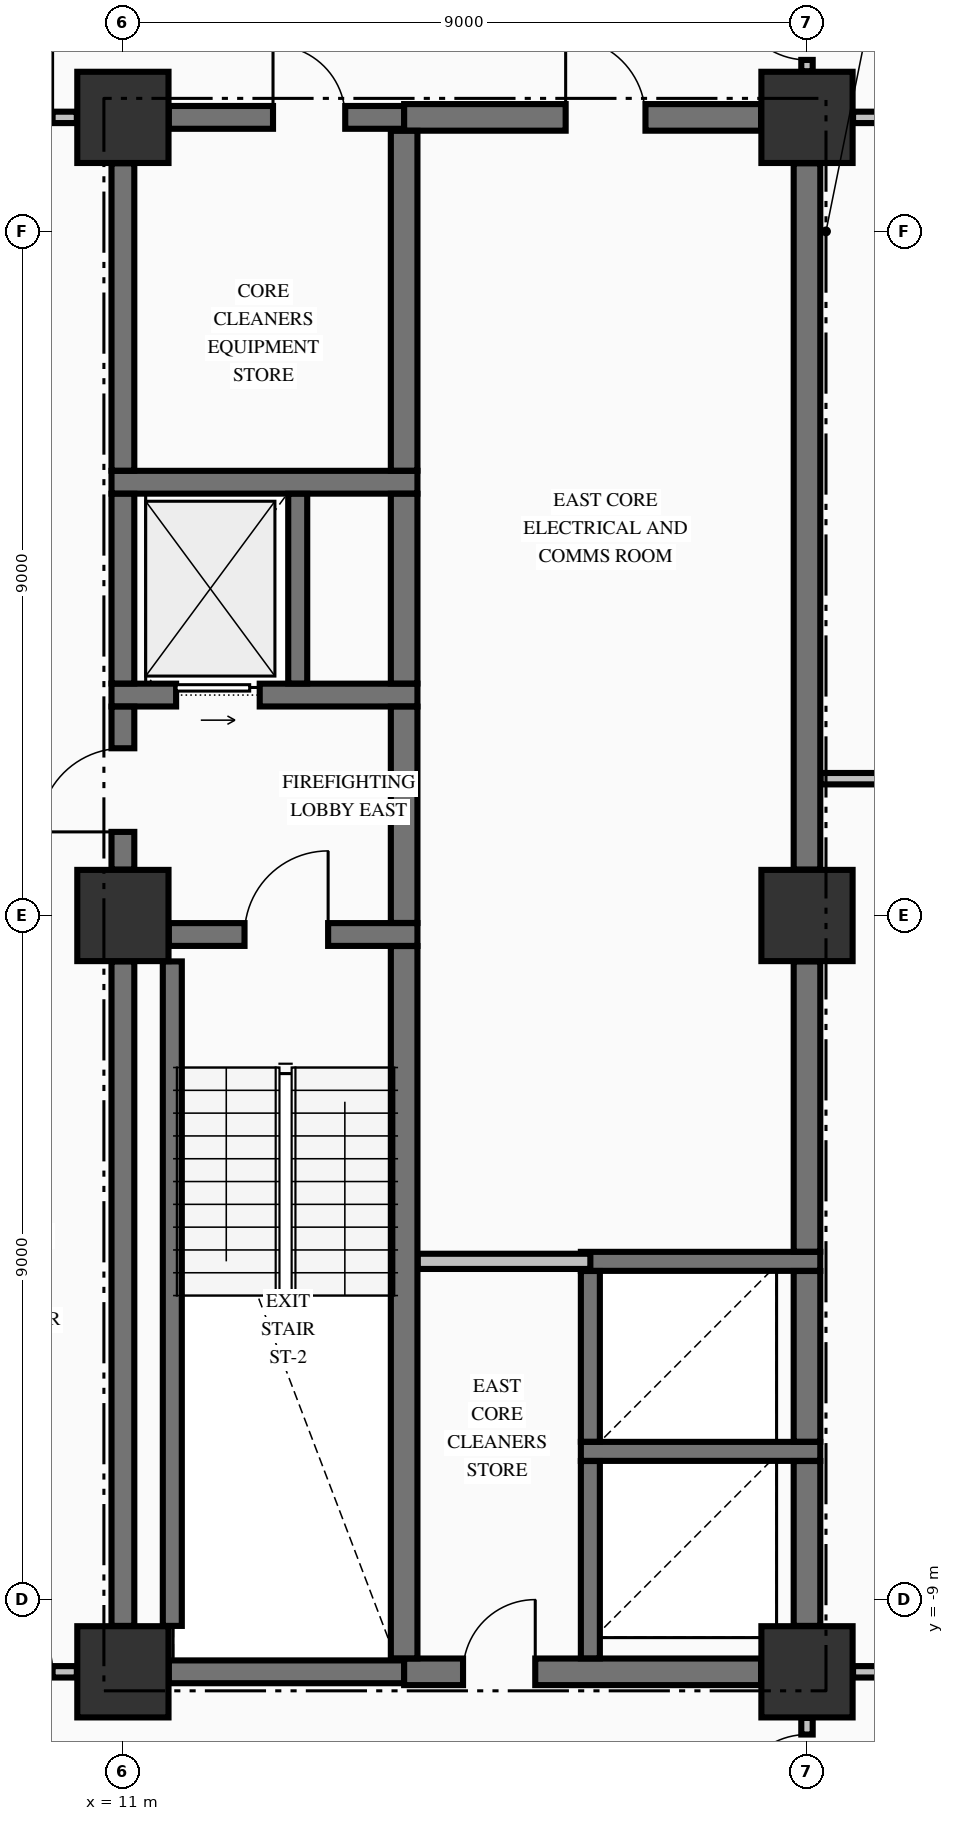
"""IFC4 building model, lengths in metres.
Left out: names, types, materials, properties, quantities, classifications, styles, units other than length and angle.
Written with IfcOpenShell. Run it as: python <this file> out.ifc"""

import sys

from ifc_helpers import new_model, si_unit, direction, frame, frame_2d, origin, origin_2d, place, context, subcontext, project, spatial, rectangle, extrude, element, fill, save


model = new_model("IFC4")
c1 = context("Model", 3, precision=1e-05, world=origin(), true_north=direction((0.0, 1.0)))
c2 = subcontext(c1, "Body", "Model", "MODEL_VIEW")
j1 = project(units=[si_unit("LENGTHUNIT", "METRE"), si_unit("PLANEANGLEUNIT", "RADIAN")], contexts=[c1])
p1 = place(None, origin())
s1 = spatial("IfcSite", under=j1, at=p1, CompositionType="ELEMENT")
p2 = place(p1, origin())
s2 = spatial("IfcBuilding", under=s1, at=p2, CompositionType="ELEMENT")
p3 = place(p2, frame((0.0, 0.0, 30.77)))
s3 = spatial("IfcBuildingStorey", under=s2, at=p3, CompositionType="ELEMENT", Elevation=30.77)
for number, where, z_axis, x_axis in (
    (1, (11.0, -9.95, -0.25), (0.0, 0.0, 1.0), (1.0, 0.0, 0.0)),
    (2, (11.0, 0.0, -0.25), (0.0, 0.0, 1.0), (1.0, 0.0, 0.0)),
    (3, (11.0, 10.5, -0.25), (0.0, 0.0, 1.0), (1.0, 0.0, 0.0)),
    (4, (20.0, -9.95, -0.25), (0.0, 0.0, 1.0), (1.0, 0.0, 0.0)),
    (5, (20.0, 10.5, -0.25), (0.0, 0.0, 1.0), (1.0, 0.0, 0.0)),
    (6, (20.0, 0.0, -0.25), (0.0, 0.0, 1.0), (1.0, 0.0, 0.0)),
):
    element("IfcColumn", number, at=place(p3, frame(where, z_axis=z_axis, x_axis=x_axis)), inside=s3, PredefinedType="COLUMN", context=c2, shape_type="SweptSolid", body=[
        extrude(rectangle(XDim=1.2, YDim=1.2, at=origin_2d()), origin(), (0.0, 0.0, 1.0), 3.52),
    ])
p4 = place(p3, frame((11.604, -9.95, 0.0), z_axis=(0.0, 0.0, 1.0), x_axis=(1.0, 0.0, 0.0)))
e7 = element("IfcWall", 7, at=p4, inside=s3, PredefinedType="SHEAR", context=c2, shape_type="SweptSolid", body=[
    extrude(rectangle(XDim=3.096, YDim=0.3, at=frame_2d((1.548, 0.0))), origin(), (0.0, 0.0, 1.0), 3.27),
])
p5 = place(p3, frame((14.7, -9.95, 0.0), z_axis=(0.0, 0.0, 1.0), x_axis=(1.0, 0.0, 0.0)))
e8 = element("IfcWall", 8, at=p5, inside=s3, PredefinedType="SHEAR", context=c2, shape_type="SweptSolid", body=[
    extrude(rectangle(XDim=4.696, YDim=0.35, at=frame_2d((2.348, 0.0))), origin(), (0.0, 0.0, 1.0), 3.27),
])
p6 = place(p5, frame((0.775, 0.0, 0.0)))
e9 = element("IfcOpeningElement", 9, at=p6, cuts=e8, PredefinedType="OPENING", context=c2, shape_type="SweptSolid", body=[
    extrude(rectangle(XDim=0.95, YDim=2.15, at=frame_2d((0.475, 1.075))), frame((0.0, 0.185, 0.0), z_axis=(0.0, -1.0, 0.0), x_axis=(1.0, 0.0, 0.0)), (0.0, 0.0, 1.0), 0.37),
])
for number, where, z_axis, x_axis in (
    (10, (17.025, -7.05, 0.0), (0.0, 0.0, 1.0), (1.0, 0.0, 0.0)),
    (11, (17.025, -4.55, 0.0), (0.0, 0.0, 1.0), (1.0, 0.0, 0.0)),
):
    element("IfcWall", number, at=place(p3, frame(where, z_axis=z_axis, x_axis=x_axis)), inside=s3, PredefinedType="SOLIDWALL", context=c2, shape_type="SweptSolid", body=[
        extrude(rectangle(XDim=3.15, YDim=0.25, at=frame_2d((1.575, 0.0))), origin(), (0.0, 0.0, 1.0), 3.27),
    ])
p7 = place(p3, frame((11.604, -0.25, 0.0), z_axis=(0.0, 0.0, 1.0), x_axis=(1.0, 0.0, 0.0)))
e12 = element("IfcWall", 12, at=p7, inside=s3, PredefinedType="SHEAR", context=c2, shape_type="SweptSolid", body=[
    extrude(rectangle(XDim=3.271, YDim=0.3, at=frame_2d((1.635, 0.0))), origin(), (0.0, 0.0, 1.0), 3.27),
])
p8 = place(p7, frame((0.996, 0.0, 0.0)))
e13 = element("IfcOpeningElement", 13, at=p8, cuts=e12, PredefinedType="OPENING", context=c2, shape_type="SweptSolid", body=[
    extrude(rectangle(XDim=1.1, YDim=2.15, at=frame_2d((0.55, 1.075))), frame((0.0, 0.16, 0.0), z_axis=(0.0, -1.0, 0.0), x_axis=(1.0, 0.0, 0.0)), (0.0, 0.0, 1.0), 0.32),
])
p9 = place(p3, frame((10.85, 2.9, 0.0), z_axis=(0.0, 0.0, 1.0), x_axis=(1.0, 0.0, 0.0)))
e14 = element("IfcWall", 14, at=p9, inside=s3, PredefinedType="SHEAR", context=c2, shape_type="SweptSolid", body=[
    extrude(rectangle(XDim=4.025, YDim=0.3, at=frame_2d((2.012, 0.0))), origin(), (0.0, 0.0, 1.0), 3.27),
])
p10 = place(p9, frame((0.85, 0.0, 0.0)))
e15 = element("IfcOpeningElement", 15, at=p10, cuts=e14, PredefinedType="OPENING", context=c2, shape_type="SweptSolid", body=[
    extrude(rectangle(XDim=1.1, YDim=2.2, at=frame_2d((0.55, 1.1))), frame((0.0, 0.16, 0.0), z_axis=(0.0, -1.0, 0.0), x_axis=(1.0, 0.0, 0.0)), (0.0, 0.0, 1.0), 0.32),
])
p11 = place(p3, frame((10.85, 5.7, 0.0), z_axis=(0.0, 0.0, 1.0), x_axis=(1.0, 0.0, 0.0)))
e16 = element("IfcWall", 16, at=p11, inside=s3, PredefinedType="SHEAR", context=c2, shape_type="SweptSolid", body=[
    extrude(rectangle(XDim=4.025, YDim=0.3, at=frame_2d((2.012, 0.0))), origin(), (0.0, 0.0, 1.0), 3.27),
])
p12 = place(p3, frame((11.604, 10.5, 0.0), z_axis=(0.0, 0.0, 1.0), x_axis=(1.0, 0.0, 0.0)))
e17 = element("IfcWall", 17, at=p12, inside=s3, PredefinedType="SHEAR", context=c2, shape_type="SweptSolid", body=[
    extrude(rectangle(XDim=3.096, YDim=0.3, at=frame_2d((1.548, 0.0))), origin(), (0.0, 0.0, 1.0), 3.27),
])
p13 = place(p12, frame((1.371, 0.0, 0.0)))
e18 = element("IfcOpeningElement", 18, at=p13, cuts=e17, PredefinedType="OPENING", context=c2, shape_type="SweptSolid", body=[
    extrude(rectangle(XDim=0.95, YDim=2.15, at=frame_2d((0.475, 1.075))), frame((0.0, 0.16, 0.0), z_axis=(0.0, -1.0, 0.0), x_axis=(1.0, 0.0, 0.0)), (0.0, 0.0, 1.0), 0.32),
])
p14 = place(p3, frame((14.7, 10.5, 0.0), z_axis=(0.0, 0.0, 1.0), x_axis=(1.0, 0.0, 0.0)))
e19 = element("IfcWall", 19, at=p14, inside=s3, PredefinedType="SHEAR", context=c2, shape_type="SweptSolid", body=[
    extrude(rectangle(XDim=4.696, YDim=0.35, at=frame_2d((2.348, 0.0))), origin(), (0.0, 0.0, 1.0), 3.27),
])
p15 = place(p14, frame((2.125, 0.0, 0.0)))
e20 = element("IfcOpeningElement", 20, at=p15, cuts=e19, PredefinedType="OPENING", context=c2, shape_type="SweptSolid", body=[
    extrude(rectangle(XDim=1.05, YDim=2.15, at=frame_2d((0.525, 1.075))), frame((0.0, 0.185, 0.0), z_axis=(0.0, -1.0, 0.0), x_axis=(1.0, 0.0, 0.0)), (0.0, 0.0, 1.0), 0.37),
])
p16 = place(p3, frame((-10.394, -9.95, 0.0), z_axis=(0.0, 0.0, 1.0), x_axis=(1.0, 0.0, 0.0)))
e21 = element("IfcWall", 21, at=p16, inside=s3, PredefinedType="PARTITIONING", context=c2, shape_type="SweptSolid", body=[
    extrude(rectangle(XDim=20.788, YDim=0.15, at=frame_2d((10.394, 0.0))), origin(), (0.0, 0.0, 1.0), 3.27),
])
p17 = place(p16, frame((0.319, 0.0, 0.0)))
e22 = element("IfcOpeningElement", 22, at=p17, cuts=e21, PredefinedType="OPENING", context=c2, shape_type="SweptSolid", body=[
    extrude(rectangle(XDim=1.05, YDim=2.15, at=frame_2d((0.525, 1.075))), frame((0.0, 0.085, 0.0), z_axis=(0.0, -1.0, 0.0), x_axis=(1.0, 0.0, 0.0)), (0.0, 0.0, 1.0), 0.17),
])
p18 = place(p16, frame((19.419, 0.0, 0.0)))
e23 = element("IfcOpeningElement", 23, at=p18, cuts=e21, PredefinedType="OPENING", context=c2, shape_type="SweptSolid", body=[
    extrude(rectangle(XDim=1.05, YDim=2.15, at=frame_2d((0.525, 1.075))), frame((0.0, 0.085, 0.0), z_axis=(0.0, -1.0, 0.0), x_axis=(1.0, 0.0, 0.0)), (0.0, 0.0, 1.0), 0.17),
])
p19 = place(p16, frame((11.569, 0.0, 0.0)))
e24 = element("IfcOpeningElement", 24, at=p19, cuts=e21, PredefinedType="OPENING", context=c2, shape_type="SweptSolid", body=[
    extrude(rectangle(XDim=0.95, YDim=2.15, at=frame_2d((0.475, 1.075))), frame((0.0, 0.085, 0.0), z_axis=(0.0, -1.0, 0.0), x_axis=(1.0, 0.0, 0.0)), (0.0, 0.0, 1.0), 0.17),
])
p20 = place(p3, frame((20.606, -9.95, 0.0), z_axis=(0.0, 0.0, 1.0), x_axis=(1.0, 0.0, 0.0)))
e25 = element("IfcWall", 25, at=p20, inside=s3, PredefinedType="PARTITIONING", context=c2, shape_type="SweptSolid", body=[
    extrude(rectangle(XDim=8.229, YDim=0.15, at=frame_2d((4.115, 0.0))), origin(), (0.0, 0.0, 1.0), 3.27),
])
p21 = place(p20, frame((3.419, 0.0, 0.0)))
e26 = element("IfcOpeningElement", 26, at=p21, cuts=e25, PredefinedType="OPENING", context=c2, shape_type="SweptSolid", body=[
    extrude(rectangle(XDim=0.95, YDim=2.15, at=frame_2d((0.475, 1.075))), frame((0.0, 0.085, 0.0), z_axis=(0.0, -1.0, 0.0), x_axis=(1.0, 0.0, 0.0)), (0.0, 0.0, 1.0), 0.17),
])
p22 = place(p3, frame((14.878, -4.55, 0.0), z_axis=(0.0, 0.0, 1.0), x_axis=(1.0, 0.0, 0.0)))
e27 = element("IfcWall", 27, at=p22, inside=s3, PredefinedType="PARTITIONING", context=c2, shape_type="SweptSolid", body=[
    extrude(rectangle(XDim=2.272, YDim=0.2, at=frame_2d((1.136, 0.0))), origin(), (0.0, 0.0, 1.0), 3.27),
])
p23 = place(p3, frame((20.178, 1.8, 0.0), z_axis=(0.0, 0.0, 1.0), x_axis=(1.0, 0.0, 0.0)))
e28 = element("IfcWall", 28, at=p23, inside=s3, PredefinedType="PARTITIONING", context=c2, shape_type="SweptSolid", body=[
    extrude(rectangle(XDim=8.657, YDim=0.15, at=frame_2d((4.329, 0.0))), origin(), (0.0, 0.0, 1.0), 3.27),
])
p24 = place(p3, frame((-10.394, 10.5, 0.0), z_axis=(0.0, 0.0, 1.0), x_axis=(1.0, 0.0, 0.0)))
e29 = element("IfcWall", 29, at=p24, inside=s3, PredefinedType="PARTITIONING", context=c2, shape_type="SweptSolid", body=[
    extrude(rectangle(XDim=20.788, YDim=0.15, at=frame_2d((10.394, 0.0))), origin(), (0.0, 0.0, 1.0), 3.27),
])
p25 = place(p24, frame((0.319, 0.0, 0.0)))
e30 = element("IfcOpeningElement", 30, at=p25, cuts=e29, PredefinedType="OPENING", context=c2, shape_type="SweptSolid", body=[
    extrude(rectangle(XDim=1.05, YDim=2.15, at=frame_2d((0.525, 1.075))), frame((0.0, 0.085, 0.0), z_axis=(0.0, -1.0, 0.0), x_axis=(1.0, 0.0, 0.0)), (0.0, 0.0, 1.0), 0.17),
])
p26 = place(p24, frame((19.419, 0.0, 0.0)))
e31 = element("IfcOpeningElement", 31, at=p26, cuts=e29, PredefinedType="OPENING", context=c2, shape_type="SweptSolid", body=[
    extrude(rectangle(XDim=1.05, YDim=2.15, at=frame_2d((0.525, 1.075))), frame((0.0, 0.085, 0.0), z_axis=(0.0, -1.0, 0.0), x_axis=(1.0, 0.0, 0.0)), (0.0, 0.0, 1.0), 0.17),
])
p27 = place(p3, frame((20.606, 10.5, 0.0), z_axis=(0.0, 0.0, 1.0), x_axis=(1.0, 0.0, 0.0)))
e32 = element("IfcWall", 32, at=p27, inside=s3, PredefinedType="PARTITIONING", context=c2, shape_type="SweptSolid", body=[
    extrude(rectangle(XDim=8.229, YDim=0.15, at=frame_2d((4.115, 0.0))), origin(), (0.0, 0.0, 1.0), 3.27),
])
p28 = place(p27, frame((3.419, 0.0, 0.0)))
e33 = element("IfcOpeningElement", 33, at=p28, cuts=e32, PredefinedType="OPENING", context=c2, shape_type="SweptSolid", body=[
    extrude(rectangle(XDim=0.95, YDim=2.15, at=frame_2d((0.475, 1.075))), frame((0.0, 0.085, 0.0), z_axis=(0.0, -1.0, 0.0), x_axis=(1.0, 0.0, 0.0)), (0.0, 0.0, 1.0), 0.17),
])
p29 = place(p3, frame((11.0, -9.346, 0.0), z_axis=(0.0, 0.0, 1.0), x_axis=(0.0, 1.0, 0.0)))
e34 = element("IfcWall", 34, at=p29, inside=s3, PredefinedType="SHEAR", context=c2, shape_type="SweptSolid", body=[
    extrude(rectangle(XDim=8.742, YDim=0.3, at=frame_2d((4.371, 0.0))), origin(), (0.0, 0.0, 1.0), 3.27),
])
p30 = place(p3, frame((11.0, 0.604, 0.0), z_axis=(0.0, 0.0, 1.0), x_axis=(0.0, 1.0, 0.0)))
e35 = element("IfcWall", 35, at=p30, inside=s3, PredefinedType="SHEAR", context=c2, shape_type="SweptSolid", body=[
    extrude(rectangle(XDim=2.144, YDim=0.3, at=frame_2d((1.072, 0.0))), origin(), (0.0, 0.0, 1.0), 3.27),
])
p31 = place(p30, frame((0.496, 0.0, 0.0)))
e36 = element("IfcOpeningElement", 36, at=p31, cuts=e35, PredefinedType="OPENING", context=c2, shape_type="SweptSolid", body=[
    extrude(rectangle(XDim=1.1, YDim=2.15, at=frame_2d((0.55, 1.075))), frame((0.0, 0.16, 0.0), z_axis=(0.0, -1.0, 0.0), x_axis=(1.0, 0.0, 0.0)), (0.0, 0.0, 1.0), 0.32),
])
p32 = place(p3, frame((11.0, 3.052, 0.0), z_axis=(0.0, 0.0, 1.0), x_axis=(0.0, 1.0, 0.0)))
e37 = element("IfcWall", 37, at=p32, inside=s3, PredefinedType="SHEAR", context=c2, shape_type="SweptSolid", body=[
    extrude(rectangle(XDim=2.496, YDim=0.3, at=frame_2d((1.248, 0.0))), origin(), (0.0, 0.0, 1.0), 3.27),
])
p33 = place(p3, frame((11.0, 5.852, 0.0), z_axis=(0.0, 0.0, 1.0), x_axis=(0.0, 1.0, 0.0)))
e38 = element("IfcWall", 38, at=p33, inside=s3, PredefinedType="SHEAR", context=c2, shape_type="SweptSolid", body=[
    extrude(rectangle(XDim=4.044, YDim=0.3, at=frame_2d((2.022, 0.0))), origin(), (0.0, 0.0, 1.0), 3.27),
])
p34 = place(p3, frame((11.65, -9.346, 0.0), z_axis=(0.0, 0.0, 1.0), x_axis=(0.0, 1.0, 0.0)))
e39 = element("IfcWall", 39, at=p34, inside=s3, PredefinedType="SOLIDWALL", context=c2, shape_type="SweptSolid", body=[
    extrude(rectangle(XDim=8.742, YDim=0.25, at=frame_2d((4.371, 0.0))), origin(), (0.0, 0.0, 1.0), 3.27),
])
p35 = place(p3, frame((13.3, 3.052, 0.0), z_axis=(0.0, 0.0, 1.0), x_axis=(0.0, 1.0, 0.0)))
e40 = element("IfcWall", 40, at=p35, inside=s3, PredefinedType="SOLIDWALL", context=c2, shape_type="SweptSolid", body=[
    extrude(rectangle(XDim=2.496, YDim=0.25, at=frame_2d((1.248, 0.0))), origin(), (0.0, 0.0, 1.0), 3.27),
])
p36 = place(p3, frame((14.7, -9.773, 0.0), z_axis=(0.0, 0.0, 1.0), x_axis=(0.0, 1.0, 0.0)))
e41 = element("IfcWall", 41, at=p36, inside=s3, PredefinedType="SHEAR", context=c2, shape_type="SweptSolid", body=[
    extrude(rectangle(XDim=9.371, YDim=0.35, at=frame_2d((4.686, 0.0))), origin(), (0.0, 0.0, 1.0), 3.27),
])
p37 = place(p3, frame((14.7, -0.098, 0.0), z_axis=(0.0, 0.0, 1.0), x_axis=(0.0, 1.0, 0.0)))
e42 = element("IfcWall", 42, at=p37, inside=s3, PredefinedType="SHEAR", context=c2, shape_type="SweptSolid", body=[
    extrude(rectangle(XDim=2.846, YDim=0.35, at=frame_2d((1.423, 0.0))), origin(), (0.0, 0.0, 1.0), 3.27),
])
p38 = place(p3, frame((14.7, 3.052, 0.0), z_axis=(0.0, 0.0, 1.0), x_axis=(0.0, 1.0, 0.0)))
e43 = element("IfcWall", 43, at=p38, inside=s3, PredefinedType="SHEAR", context=c2, shape_type="SweptSolid", body=[
    extrude(rectangle(XDim=2.496, YDim=0.35, at=frame_2d((1.248, 0.0))), origin(), (0.0, 0.0, 1.0), 3.27),
])
p39 = place(p3, frame((14.7, 5.852, 0.0), z_axis=(0.0, 0.0, 1.0), x_axis=(0.0, 1.0, 0.0)))
e44 = element("IfcWall", 44, at=p39, inside=s3, PredefinedType="SHEAR", context=c2, shape_type="SweptSolid", body=[
    extrude(rectangle(XDim=4.471, YDim=0.35, at=frame_2d((2.235, 0.0))), origin(), (0.0, 0.0, 1.0), 3.27),
])
p40 = place(p3, frame((17.15, -9.773, 0.0), z_axis=(0.0, 0.0, 1.0), x_axis=(0.0, 1.0, 0.0)))
e45 = element("IfcWall", 45, at=p40, inside=s3, PredefinedType="SOLIDWALL", context=c2, shape_type="SweptSolid", body=[
    extrude(rectangle(XDim=2.596, YDim=0.25, at=frame_2d((1.298, 0.0))), origin(), (0.0, 0.0, 1.0), 3.27),
])
p41 = place(p3, frame((17.15, -6.923, 0.0), z_axis=(0.0, 0.0, 1.0), x_axis=(0.0, 1.0, 0.0)))
e46 = element("IfcWall", 46, at=p41, inside=s3, PredefinedType="SOLIDWALL", context=c2, shape_type="SweptSolid", body=[
    extrude(rectangle(XDim=2.246, YDim=0.25, at=frame_2d((1.123, 0.0))), origin(), (0.0, 0.0, 1.0), 3.27),
])
p42 = place(p3, frame((20.0, -9.346, 0.0), z_axis=(0.0, 0.0, 1.0), x_axis=(0.0, 1.0, 0.0)))
e47 = element("IfcWall", 47, at=p42, inside=s3, PredefinedType="SHEAR", context=c2, shape_type="SweptSolid", body=[
    extrude(rectangle(XDim=2.169, YDim=0.35, at=frame_2d((1.084, 0.0))), origin(), (0.0, 0.0, 1.0), 3.27),
])
p43 = place(p3, frame((20.0, -6.923, 0.0), z_axis=(0.0, 0.0, 1.0), x_axis=(0.0, 1.0, 0.0)))
e48 = element("IfcWall", 48, at=p43, inside=s3, PredefinedType="SHEAR", context=c2, shape_type="SweptSolid", body=[
    extrude(rectangle(XDim=2.246, YDim=0.35, at=frame_2d((1.123, 0.0))), origin(), (0.0, 0.0, 1.0), 3.27),
])
p44 = place(p3, frame((20.0, -4.423, 0.0), z_axis=(0.0, 0.0, 1.0), x_axis=(0.0, 1.0, 0.0)))
e49 = element("IfcWall", 49, at=p44, inside=s3, PredefinedType="SHEAR", context=c2, shape_type="SweptSolid", body=[
    extrude(rectangle(XDim=3.819, YDim=0.35, at=frame_2d((1.91, 0.0))), origin(), (0.0, 0.0, 1.0), 3.27),
])
p45 = place(p3, frame((20.0, 0.604, 0.0), z_axis=(0.0, 0.0, 1.0), x_axis=(0.0, 1.0, 0.0)))
e50 = element("IfcWall", 50, at=p45, inside=s3, PredefinedType="SHEAR", context=c2, shape_type="SweptSolid", body=[
    extrude(rectangle(XDim=9.292, YDim=0.35, at=frame_2d((4.646, 0.0))), origin(), (0.0, 0.0, 1.0), 3.27),
])
p46 = place(p3, frame((20.0, -12.472, 0.0), z_axis=(0.0, 0.0, 1.0), x_axis=(0.0, 1.0, 0.0)))
e51 = element("IfcWall", 51, at=p46, inside=s3, PredefinedType="PARTITIONING", context=c2, shape_type="SweptSolid", body=[
    extrude(rectangle(XDim=1.916, YDim=0.15, at=frame_2d((0.958, 0.0))), origin(), (0.0, 0.0, 1.0), 2.61),
])
p47 = place(p46, frame((0.747, 0.0, 0.0)))
e52 = element("IfcOpeningElement", 52, at=p47, cuts=e51, PredefinedType="OPENING", context=c2, shape_type="SweptSolid", body=[
    extrude(rectangle(XDim=0.95, YDim=2.15, at=frame_2d((0.475, 1.075))), frame((0.0, 0.085, 0.0), z_axis=(0.0, -1.0, 0.0), x_axis=(1.0, 0.0, 0.0)), (0.0, 0.0, 1.0), 0.17),
])
p48 = place(p3, frame((20.0, 11.106, 0.0), z_axis=(0.0, 0.0, 1.0), x_axis=(0.0, 1.0, 0.0)))
e53 = element("IfcWall", 53, at=p48, inside=s3, PredefinedType="PARTITIONING", context=c2, shape_type="SweptSolid", body=[
    extrude(rectangle(XDim=1.566, YDim=0.15, at=frame_2d((0.783, 0.0))), origin(), (0.0, 0.0, 1.0), 2.61),
])
p49 = place(p48, frame((0.15, 0.0, 0.0)))
e54 = element("IfcOpeningElement", 54, at=p49, cuts=e53, PredefinedType="OPENING", context=c2, shape_type="SweptSolid", body=[
    extrude(rectangle(XDim=0.95, YDim=2.15, at=frame_2d((0.475, 1.075))), frame((0.0, 0.085, 0.0), z_axis=(0.0, -1.0, 0.0), x_axis=(1.0, 0.0, 0.0)), (0.0, 0.0, 1.0), 0.17),
])
p50 = place(p8, origin())
e55 = element("IfcDoor", 55, at=p50, inside=s3, OperationType="SINGLE_SWING_RIGHT", PredefinedType="DOOR", context=c2, shape_type="SweptSolid", body=[
    extrude(rectangle(XDim=1.1, YDim=2.15, at=frame_2d((0.55, 1.075))), frame((0.0, 0.025, 0.0), z_axis=(0.0, -1.0, 0.0), x_axis=(1.0, 0.0, 0.0)), (0.0, 0.0, 1.0), 0.05),
])
fill(e13, e55)
p51 = place(p31, origin())
e56 = element("IfcDoor", 56, at=p51, inside=s3, OperationType="SINGLE_SWING_LEFT", PredefinedType="DOOR", context=c2, shape_type="SweptSolid", body=[
    extrude(rectangle(XDim=1.1, YDim=2.15, at=frame_2d((0.55, 1.075))), frame((0.0, 0.025, 0.0), z_axis=(0.0, -1.0, 0.0), x_axis=(1.0, 0.0, 0.0)), (0.0, 0.0, 1.0), 0.05),
])
fill(e36, e56)
p52 = place(p10, origin())
e57 = element("IfcDoor", 57, at=p52, inside=s3, OperationType="SLIDING_TO_RIGHT", PredefinedType="DOOR", context=c2, shape_type="SweptSolid", body=[
    extrude(rectangle(XDim=1.1, YDim=2.2, at=frame_2d((0.55, 1.1))), frame((0.0, 0.025, 0.0), z_axis=(0.0, -1.0, 0.0), x_axis=(1.0, 0.0, 0.0)), (0.0, 0.0, 1.0), 0.05),
])
fill(e15, e57)
p53 = place(p13, origin())
e58 = element("IfcDoor", 58, at=p53, inside=s3, OperationType="SINGLE_SWING_LEFT", PredefinedType="DOOR", context=c2, shape_type="SweptSolid", body=[
    extrude(rectangle(XDim=0.95, YDim=2.15, at=frame_2d((0.475, 1.075))), frame((0.0, 0.025, 0.0), z_axis=(0.0, -1.0, 0.0), x_axis=(1.0, 0.0, 0.0)), (0.0, 0.0, 1.0), 0.05),
])
fill(e18, e58)
p54 = place(p6, origin())
e59 = element("IfcDoor", 59, at=p54, inside=s3, OperationType="SINGLE_SWING_RIGHT", PredefinedType="DOOR", context=c2, shape_type="SweptSolid", body=[
    extrude(rectangle(XDim=0.95, YDim=2.15, at=frame_2d((0.475, 1.075))), frame((0.0, 0.025, 0.0), z_axis=(0.0, -1.0, 0.0), x_axis=(1.0, 0.0, 0.0)), (0.0, 0.0, 1.0), 0.05),
])
fill(e9, e59)
p55 = place(p15, origin())
e60 = element("IfcDoor", 60, at=p55, inside=s3, OperationType="SINGLE_SWING_LEFT", PredefinedType="DOOR", context=c2, shape_type="SweptSolid", body=[
    extrude(rectangle(XDim=1.05, YDim=2.15, at=frame_2d((0.525, 1.075))), frame((0.0, 0.025, 0.0), z_axis=(0.0, -1.0, 0.0), x_axis=(1.0, 0.0, 0.0)), (0.0, 0.0, 1.0), 0.05),
])
fill(e20, e60)
p56 = place(p49, origin())
e61 = element("IfcDoor", 61, at=p56, inside=s3, OperationType="SINGLE_SWING_RIGHT", PredefinedType="DOOR", context=c2, shape_type="SweptSolid", body=[
    extrude(rectangle(XDim=0.95, YDim=2.15, at=frame_2d((0.475, 1.075))), frame((0.0, 0.025, 0.0), z_axis=(0.0, -1.0, 0.0), x_axis=(1.0, 0.0, 0.0)), (0.0, 0.0, 1.0), 0.05),
])
fill(e54, e61)
p57 = place(p47, origin())
e62 = element("IfcDoor", 62, at=p57, inside=s3, OperationType="SINGLE_SWING_LEFT", PredefinedType="DOOR", context=c2, shape_type="SweptSolid", body=[
    extrude(rectangle(XDim=0.95, YDim=2.15, at=frame_2d((0.475, 1.075))), frame((0.0, 0.025, 0.0), z_axis=(0.0, -1.0, 0.0), x_axis=(1.0, 0.0, 0.0)), (0.0, 0.0, 1.0), 0.05),
])
fill(e52, e62)
save(model, sys.argv[1])
